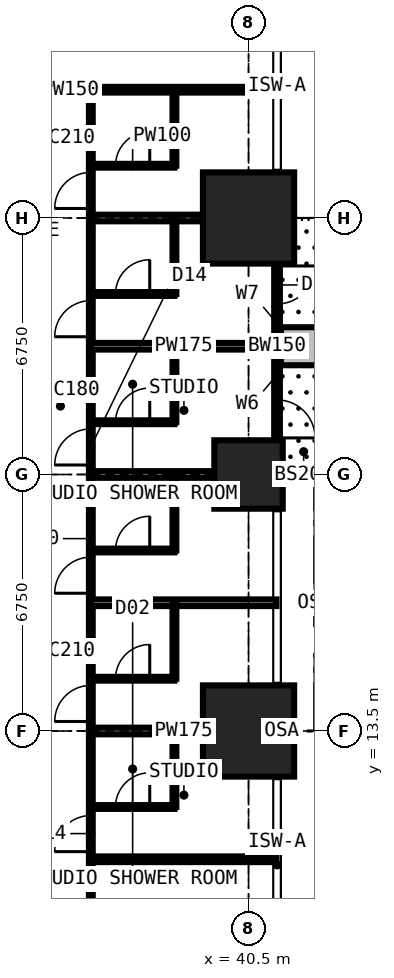
"""IFC4 building model, lengths in metres.
Left out: names, types, materials, properties, quantities, classifications, styles, units other than length and angle.
Written with IfcOpenShell. Run it as: python <this file> out.ifc"""

import sys

from ifc_helpers import new_model, si_unit, direction, frame, frame_2d, origin, origin_2d, place, context, subcontext, project, spatial, rectangle, extrude, element, fill, save


model = new_model("IFC4")
c1 = context("Model", 3, precision=1e-05, world=origin(), true_north=direction((0.0, 1.0)))
c2 = subcontext(c1, "Body", "Model", "MODEL_VIEW")
j1 = project(units=[si_unit("LENGTHUNIT", "METRE"), si_unit("PLANEANGLEUNIT", "RADIAN")], contexts=[c1])
p1 = place(None, origin())
s1 = spatial("IfcSite", under=j1, at=p1, CompositionType="ELEMENT")
p2 = place(p1, origin())
s2 = spatial("IfcBuilding", under=s1, at=p2, CompositionType="ELEMENT")
p3 = place(p2, frame((0.0, 0.0, 72.0)))
s3 = spatial("IfcBuildingStorey", under=s2, at=p3, CompositionType="ELEMENT", Elevation=72.0)
p4 = place(p3, frame((40.5, 13.5, 0.0), z_axis=(0.0, 0.0, 1.0), x_axis=(1.0, 0.0, 0.0)))
e1 = element("IfcColumn", 1, at=p4, inside=s3, PredefinedType="COLUMN", context=c2, shape_type="SweptSolid", body=[
    extrude(rectangle(XDim=2.4, YDim=2.4, at=origin_2d()), origin(), (0.0, 0.0, 1.0), 3.6),
])
p5 = place(p3, frame((40.5, 20.25, 0.0), z_axis=(0.0, 0.0, 1.0), x_axis=(1.0, 0.0, 0.0)))
e2 = element("IfcColumn", 2, at=p5, inside=s3, PredefinedType="COLUMN", context=c2, shape_type="SweptSolid", body=[
    extrude(rectangle(XDim=1.8, YDim=1.8, at=origin_2d()), origin(), (0.0, 0.0, 1.0), 3.6),
])
p6 = place(p3, frame((40.5, 27.0, 0.0), z_axis=(0.0, 0.0, 1.0), x_axis=(1.0, 0.0, 0.0)))
e3 = element("IfcColumn", 3, at=p6, inside=s3, PredefinedType="COLUMN", context=c2, shape_type="SweptSolid", body=[
    extrude(rectangle(XDim=2.4, YDim=2.4, at=origin_2d()), origin(), (0.0, 0.0, 1.0), 3.6),
])
p7 = place(p3, frame((41.25, 27.0, 0.0), z_axis=(0.0, 0.0, 1.0), x_axis=(0.0, -1.0, 0.0)))
e4 = element("IfcWall", 4, at=p7, inside=s3, PredefinedType="SOLIDWALL", context=c2, shape_type="SweptSolid", body=[
    extrude(rectangle(XDim=6.75, YDim=0.15, at=frame_2d((3.375, 0.0))), origin(), (0.0, 0.0, 1.0), 3.3),
])
p8 = place(p7, frame((1.262, 0.0, 0.0)))
e5 = element("IfcOpeningElement", 5, at=p8, cuts=e4, PredefinedType="OPENING", context=c2, shape_type="SweptSolid", body=[
    extrude(rectangle(XDim=1.0, YDim=2.2, at=frame_2d((0.5, 1.1))), frame((0.0, 0.085, 0.0), z_axis=(0.0, -1.0, 0.0), x_axis=(1.0, 0.0, 0.0)), (0.0, 0.0, 1.0), 0.17),
])
p9 = place(p7, frame((2.325, 0.0, 0.9)))
e6 = element("IfcOpeningElement", 6, at=p9, cuts=e4, PredefinedType="OPENING", context=c2, shape_type="SweptSolid", body=[
    extrude(rectangle(XDim=0.9, YDim=1.8, at=frame_2d((0.45, 0.9))), frame((0.0, 0.085, 0.0), z_axis=(0.0, -1.0, 0.0), x_axis=(1.0, 0.0, 0.0)), (0.0, 0.0, 1.0), 0.17),
])
p10 = place(p7, frame((4.788, 0.0, 0.0)))
e7 = element("IfcOpeningElement", 7, at=p10, cuts=e4, PredefinedType="OPENING", context=c2, shape_type="SweptSolid", body=[
    extrude(rectangle(XDim=1.0, YDim=2.2, at=frame_2d((0.5, 1.1))), frame((0.0, 0.085, 0.0), z_axis=(0.0, -1.0, 0.0), x_axis=(1.0, 0.0, 0.0)), (0.0, 0.0, 1.0), 0.17),
])
p11 = place(p7, frame((3.525, 0.0, 0.9)))
e8 = element("IfcOpeningElement", 8, at=p11, cuts=e4, PredefinedType="OPENING", context=c2, shape_type="SweptSolid", body=[
    extrude(rectangle(XDim=1.2, YDim=1.8, at=frame_2d((0.6, 0.9))), frame((0.0, 0.085, 0.0), z_axis=(0.0, -1.0, 0.0), x_axis=(1.0, 0.0, 0.0)), (0.0, 0.0, 1.0), 0.17),
])
p12 = place(p3, frame((41.35, 23.625, 0.0), z_axis=(0.0, 0.0, 1.0), x_axis=(1.0, 0.0, 0.0)))
e9 = element("IfcWall", 9, at=p12, inside=s3, PredefinedType="USERDEFINED", context=c2, shape_type="SweptSolid", body=[
    extrude(rectangle(XDim=2.2, YDim=1.0, at=frame_2d((1.1, 0.0))), origin(), (0.0, 0.0, 1.0), 0.9),
])
p13 = place(p3, frame((30.375, 30.375, 0.0), z_axis=(0.0, 0.0, 1.0), x_axis=(1.0, 0.0, 0.0)))
e10 = element("IfcWall", 10, at=p13, inside=s3, PredefinedType="PARTITIONING", context=c2, shape_type="SweptSolid", body=[
    extrude(rectangle(XDim=10.859, YDim=0.15, at=frame_2d((5.429, 0.0))), origin(), (0.0, 0.0, 1.0), 3.3),
])
p14 = place(p3, frame((36.35, 6.75, 0.0), z_axis=(0.0, 0.0, 1.0), x_axis=(0.0, 1.0, 0.0)))
e11 = element("IfcWall", 11, at=p14, inside=s3, PredefinedType="PARTITIONING", context=c2, shape_type="SweptSolid", body=[
    extrude(rectangle(XDim=23.625, YDim=0.1, at=frame_2d((11.812, 0.0))), origin(), (0.0, 0.0, 1.0), 3.3),
])
p15 = place(p14, frame((3.575, 0.0, 0.0)))
e12 = element("IfcOpeningElement", 12, at=p15, cuts=e11, PredefinedType="OPENING", context=c2, shape_type="SweptSolid", body=[
    extrude(rectangle(XDim=0.95, YDim=2.2, at=frame_2d((0.475, 1.1))), frame((0.0, 0.06, 0.0), z_axis=(0.0, -1.0, 0.0), x_axis=(1.0, 0.0, 0.0)), (0.0, 0.0, 1.0), 0.12),
])
p16 = place(p14, frame((7.0, 0.0, 0.0)))
e13 = element("IfcOpeningElement", 13, at=p16, cuts=e11, PredefinedType="OPENING", context=c2, shape_type="SweptSolid", body=[
    extrude(rectangle(XDim=0.95, YDim=2.2, at=frame_2d((0.475, 1.1))), frame((0.0, 0.06, 0.0), z_axis=(0.0, -1.0, 0.0), x_axis=(1.0, 0.0, 0.0)), (0.0, 0.0, 1.0), 0.12),
])
p17 = place(p14, frame((10.375, 0.0, 0.0)))
e14 = element("IfcOpeningElement", 14, at=p17, cuts=e11, PredefinedType="OPENING", context=c2, shape_type="SweptSolid", body=[
    extrude(rectangle(XDim=0.95, YDim=2.2, at=frame_2d((0.475, 1.1))), frame((0.0, 0.06, 0.0), z_axis=(0.0, -1.0, 0.0), x_axis=(1.0, 0.0, 0.0)), (0.0, 0.0, 1.0), 0.12),
])
p18 = place(p14, frame((13.75, 0.0, 0.0)))
e15 = element("IfcOpeningElement", 15, at=p18, cuts=e11, PredefinedType="OPENING", context=c2, shape_type="SweptSolid", body=[
    extrude(rectangle(XDim=0.95, YDim=2.2, at=frame_2d((0.475, 1.1))), frame((0.0, 0.06, 0.0), z_axis=(0.0, -1.0, 0.0), x_axis=(1.0, 0.0, 0.0)), (0.0, 0.0, 1.0), 0.12),
])
p19 = place(p14, frame((17.125, 0.0, 0.0)))
e16 = element("IfcOpeningElement", 16, at=p19, cuts=e11, PredefinedType="OPENING", context=c2, shape_type="SweptSolid", body=[
    extrude(rectangle(XDim=0.95, YDim=2.2, at=frame_2d((0.475, 1.1))), frame((0.0, 0.06, 0.0), z_axis=(0.0, -1.0, 0.0), x_axis=(1.0, 0.0, 0.0)), (0.0, 0.0, 1.0), 0.12),
])
p20 = place(p14, frame((20.5, 0.0, 0.0)))
e17 = element("IfcOpeningElement", 17, at=p20, cuts=e11, PredefinedType="OPENING", context=c2, shape_type="SweptSolid", body=[
    extrude(rectangle(XDim=0.95, YDim=2.2, at=frame_2d((0.475, 1.1))), frame((0.0, 0.06, 0.0), z_axis=(0.0, -1.0, 0.0), x_axis=(1.0, 0.0, 0.0)), (0.0, 0.0, 1.0), 0.12),
])
p21 = place(p3, frame((36.35, 10.125, 0.0), z_axis=(0.0, 0.0, 1.0), x_axis=(1.0, 0.0, 0.0)))
e18 = element("IfcWall", 18, at=p21, inside=s3, PredefinedType="PARTITIONING", context=c2, shape_type="SweptSolid", body=[
    extrude(rectangle(XDim=4.884, YDim=0.15, at=frame_2d((2.442, 0.0))), origin(), (0.0, 0.0, 1.0), 3.3),
])
p22 = place(p3, frame((36.35, 11.5, 0.0), z_axis=(0.0, 0.0, 1.0), x_axis=(1.0, 0.0, 0.0)))
e19 = element("IfcWall", 19, at=p22, inside=s3, PredefinedType="PARTITIONING", context=c2, shape_type="SweptSolid", body=[
    extrude(rectangle(XDim=2.2, YDim=0.1, at=frame_2d((1.1, 0.0))), origin(), (0.0, 0.0, 1.0), 3.3),
])
p23 = place(p22, frame((0.65, 0.0, 0.0)))
e20 = element("IfcOpeningElement", 20, at=p23, cuts=e19, PredefinedType="OPENING", context=c2, shape_type="SweptSolid", body=[
    extrude(rectangle(XDim=0.9, YDim=2.2, at=frame_2d((0.45, 1.1))), frame((0.0, 0.06, 0.0), z_axis=(0.0, -1.0, 0.0), x_axis=(1.0, 0.0, 0.0)), (0.0, 0.0, 1.0), 0.12),
])
p24 = place(p3, frame((36.35, 13.5, 0.0), z_axis=(0.0, 0.0, 1.0), x_axis=(1.0, 0.0, 0.0)))
e21 = element("IfcWall", 21, at=p24, inside=s3, PredefinedType="PARTITIONING", context=c2, shape_type="SweptSolid", body=[
    extrude(rectangle(XDim=4.884, YDim=0.175, at=frame_2d((2.442, 0.0))), origin(), (0.0, 0.0, 1.0), 2.731),
])
p25 = place(p3, frame((36.35, 14.875, 0.0), z_axis=(0.0, 0.0, 1.0), x_axis=(1.0, 0.0, 0.0)))
e22 = element("IfcWall", 22, at=p25, inside=s3, PredefinedType="PARTITIONING", context=c2, shape_type="SweptSolid", body=[
    extrude(rectangle(XDim=2.2, YDim=0.1, at=frame_2d((1.1, 0.0))), origin(), (0.0, 0.0, 1.0), 3.3),
])
p26 = place(p25, frame((0.65, 0.0, 0.0)))
e23 = element("IfcOpeningElement", 23, at=p26, cuts=e22, PredefinedType="OPENING", context=c2, shape_type="SweptSolid", body=[
    extrude(rectangle(XDim=0.9, YDim=2.2, at=frame_2d((0.45, 1.1))), frame((0.0, 0.06, 0.0), z_axis=(0.0, -1.0, 0.0), x_axis=(1.0, 0.0, 0.0)), (0.0, 0.0, 1.0), 0.12),
])
p27 = place(p3, frame((36.35, 16.875, 0.0), z_axis=(0.0, 0.0, 1.0), x_axis=(1.0, 0.0, 0.0)))
e24 = element("IfcWall", 24, at=p27, inside=s3, PredefinedType="PARTITIONING", context=c2, shape_type="SweptSolid", body=[
    extrude(rectangle(XDim=4.884, YDim=0.175, at=frame_2d((2.442, 0.0))), origin(), (0.0, 0.0, 1.0), 3.3),
])
p28 = place(p3, frame((36.35, 18.25, 0.0), z_axis=(0.0, 0.0, 1.0), x_axis=(1.0, 0.0, 0.0)))
e25 = element("IfcWall", 25, at=p28, inside=s3, PredefinedType="PARTITIONING", context=c2, shape_type="SweptSolid", body=[
    extrude(rectangle(XDim=2.2, YDim=0.1, at=frame_2d((1.1, 0.0))), origin(), (0.0, 0.0, 1.0), 3.3),
])
p29 = place(p28, frame((0.65, 0.0, 0.0)))
e26 = element("IfcOpeningElement", 26, at=p29, cuts=e25, PredefinedType="OPENING", context=c2, shape_type="SweptSolid", body=[
    extrude(rectangle(XDim=0.9, YDim=2.2, at=frame_2d((0.45, 1.1))), frame((0.0, 0.06, 0.0), z_axis=(0.0, -1.0, 0.0), x_axis=(1.0, 0.0, 0.0)), (0.0, 0.0, 1.0), 0.12),
])
p30 = place(p3, frame((36.35, 20.25, 0.0), z_axis=(0.0, 0.0, 1.0), x_axis=(1.0, 0.0, 0.0)))
e27 = element("IfcWall", 27, at=p30, inside=s3, PredefinedType="PARTITIONING", context=c2, shape_type="SweptSolid", body=[
    extrude(rectangle(XDim=4.884, YDim=0.175, at=frame_2d((2.442, 0.0))), origin(), (0.0, 0.0, 1.0), 2.802),
])
p31 = place(p3, frame((36.35, 21.625, 0.0), z_axis=(0.0, 0.0, 1.0), x_axis=(1.0, 0.0, 0.0)))
e28 = element("IfcWall", 28, at=p31, inside=s3, PredefinedType="PARTITIONING", context=c2, shape_type="SweptSolid", body=[
    extrude(rectangle(XDim=2.2, YDim=0.1, at=frame_2d((1.1, 0.0))), origin(), (0.0, 0.0, 1.0), 3.3),
])
p32 = place(p31, frame((0.65, 0.0, 0.0)))
e29 = element("IfcOpeningElement", 29, at=p32, cuts=e28, PredefinedType="OPENING", context=c2, shape_type="SweptSolid", body=[
    extrude(rectangle(XDim=0.9, YDim=2.2, at=frame_2d((0.45, 1.1))), frame((0.0, 0.06, 0.0), z_axis=(0.0, -1.0, 0.0), x_axis=(1.0, 0.0, 0.0)), (0.0, 0.0, 1.0), 0.12),
])
p33 = place(p3, frame((36.35, 23.625, 0.0), z_axis=(0.0, 0.0, 1.0), x_axis=(1.0, 0.0, 0.0)))
e30 = element("IfcWall", 30, at=p33, inside=s3, PredefinedType="PARTITIONING", context=c2, shape_type="SweptSolid", body=[
    extrude(rectangle(XDim=4.884, YDim=0.175, at=frame_2d((2.442, 0.0))), origin(), (0.0, 0.0, 1.0), 3.3),
])
p34 = place(p3, frame((36.35, 25.0, 0.0), z_axis=(0.0, 0.0, 1.0), x_axis=(1.0, 0.0, 0.0)))
e31 = element("IfcWall", 31, at=p34, inside=s3, PredefinedType="PARTITIONING", context=c2, shape_type="SweptSolid", body=[
    extrude(rectangle(XDim=2.2, YDim=0.1, at=frame_2d((1.1, 0.0))), origin(), (0.0, 0.0, 1.0), 3.3),
])
p35 = place(p34, frame((0.65, 0.0, 0.0)))
e32 = element("IfcOpeningElement", 32, at=p35, cuts=e31, PredefinedType="OPENING", context=c2, shape_type="SweptSolid", body=[
    extrude(rectangle(XDim=0.9, YDim=2.2, at=frame_2d((0.45, 1.1))), frame((0.0, 0.06, 0.0), z_axis=(0.0, -1.0, 0.0), x_axis=(1.0, 0.0, 0.0)), (0.0, 0.0, 1.0), 0.12),
])
p36 = place(p3, frame((36.35, 27.0, 0.0), z_axis=(0.0, 0.0, 1.0), x_axis=(1.0, 0.0, 0.0)))
e33 = element("IfcWall", 33, at=p36, inside=s3, PredefinedType="PARTITIONING", context=c2, shape_type="SweptSolid", body=[
    extrude(rectangle(XDim=4.884, YDim=0.175, at=frame_2d((2.442, 0.0))), origin(), (0.0, 0.0, 1.0), 2.731),
])
p37 = place(p3, frame((36.35, 28.375, 0.0), z_axis=(0.0, 0.0, 1.0), x_axis=(1.0, 0.0, 0.0)))
e34 = element("IfcWall", 34, at=p37, inside=s3, PredefinedType="PARTITIONING", context=c2, shape_type="SweptSolid", body=[
    extrude(rectangle(XDim=2.2, YDim=0.1, at=frame_2d((1.1, 0.0))), origin(), (0.0, 0.0, 1.0), 3.3),
])
p38 = place(p37, frame((0.65, 0.0, 0.0)))
e35 = element("IfcOpeningElement", 35, at=p38, cuts=e34, PredefinedType="OPENING", context=c2, shape_type="SweptSolid", body=[
    extrude(rectangle(XDim=0.9, YDim=2.2, at=frame_2d((0.45, 1.1))), frame((0.0, 0.06, 0.0), z_axis=(0.0, -1.0, 0.0), x_axis=(1.0, 0.0, 0.0)), (0.0, 0.0, 1.0), 0.12),
])
for number, where, z_axis, x_axis in (
    (36, (38.55, 11.5, 0.0), (0.0, 0.0, 1.0), (0.0, 1.0, 0.0)),
    (37, (38.55, 14.875, 0.0), (0.0, 0.0, 1.0), (0.0, 1.0, 0.0)),
    (38, (38.55, 18.25, 0.0), (0.0, 0.0, 1.0), (0.0, 1.0, 0.0)),
    (39, (38.55, 21.625, 0.0), (0.0, 0.0, 1.0), (0.0, 1.0, 0.0)),
    (40, (38.55, 25.0, 0.0), (0.0, 0.0, 1.0), (0.0, 1.0, 0.0)),
    (41, (38.55, 28.375, 0.0), (0.0, 0.0, 1.0), (0.0, 1.0, 0.0)),
):
    element("IfcWall", number, at=place(p3, frame(where, z_axis=z_axis, x_axis=x_axis)), inside=s3, PredefinedType="PARTITIONING", context=c2, shape_type="SweptSolid", body=[
        extrude(rectangle(XDim=2.0, YDim=0.1, at=frame_2d((1.0, 0.0))), origin(), (0.0, 0.0, 1.0), 3.3),
    ])
p39 = place(p8, origin())
e42 = element("IfcDoor", 42, at=p39, inside=s3, OperationType="SINGLE_SWING_LEFT", PredefinedType="DOOR", context=c2, shape_type="SweptSolid", body=[
    extrude(rectangle(XDim=1.0, YDim=2.2, at=frame_2d((0.5, 1.1))), frame((0.0, 0.025, 0.0), z_axis=(0.0, -1.0, 0.0), x_axis=(1.0, 0.0, 0.0)), (0.0, 0.0, 1.0), 0.05),
])
fill(e5, e42)
p40 = place(p9, origin())
e43 = element("IfcWindow", 43, at=p40, inside=s3, PartitioningType="SINGLE_PANEL", PredefinedType="WINDOW", context=c2, shape_type="SweptSolid", body=[
    extrude(rectangle(XDim=0.9, YDim=1.8, at=frame_2d((0.45, 0.9))), frame((0.0, 0.03, 0.0), z_axis=(0.0, -1.0, 0.0), x_axis=(1.0, 0.0, 0.0)), (0.0, 0.0, 1.0), 0.06),
])
fill(e6, e43)
p41 = place(p10, origin())
e44 = element("IfcDoor", 44, at=p41, inside=s3, OperationType="SINGLE_SWING_RIGHT", PredefinedType="DOOR", context=c2, shape_type="SweptSolid", body=[
    extrude(rectangle(XDim=1.0, YDim=2.2, at=frame_2d((0.5, 1.1))), frame((0.0, 0.025, 0.0), z_axis=(0.0, -1.0, 0.0), x_axis=(1.0, 0.0, 0.0)), (0.0, 0.0, 1.0), 0.05),
])
fill(e7, e44)
p42 = place(p11, origin())
e45 = element("IfcWindow", 45, at=p42, inside=s3, PartitioningType="SINGLE_PANEL", PredefinedType="WINDOW", context=c2, shape_type="SweptSolid", body=[
    extrude(rectangle(XDim=1.2, YDim=1.8, at=frame_2d((0.6, 0.9))), frame((0.0, 0.03, 0.0), z_axis=(0.0, -1.0, 0.0), x_axis=(1.0, 0.0, 0.0)), (0.0, 0.0, 1.0), 0.06),
])
fill(e8, e45)
p43 = place(p15, origin())
e46 = element("IfcDoor", 46, at=p43, inside=s3, OperationType="SINGLE_SWING_LEFT", PredefinedType="DOOR", context=c2, shape_type="SweptSolid", body=[
    extrude(rectangle(XDim=0.95, YDim=2.2, at=frame_2d((0.475, 1.1))), frame((0.0, 0.025, 0.0), z_axis=(0.0, -1.0, 0.0), x_axis=(1.0, 0.0, 0.0)), (0.0, 0.0, 1.0), 0.05),
])
fill(e12, e46)
p44 = place(p23, origin())
e47 = element("IfcDoor", 47, at=p44, inside=s3, OperationType="SINGLE_SWING_RIGHT", PredefinedType="DOOR", context=c2, shape_type="SweptSolid", body=[
    extrude(rectangle(XDim=0.9, YDim=2.2, at=frame_2d((0.45, 1.1))), frame((0.0, 0.025, 0.0), z_axis=(0.0, -1.0, 0.0), x_axis=(1.0, 0.0, 0.0)), (0.0, 0.0, 1.0), 0.05),
])
fill(e20, e47)
p45 = place(p16, origin())
e48 = element("IfcDoor", 48, at=p45, inside=s3, OperationType="SINGLE_SWING_LEFT", PredefinedType="DOOR", context=c2, shape_type="SweptSolid", body=[
    extrude(rectangle(XDim=0.95, YDim=2.2, at=frame_2d((0.475, 1.1))), frame((0.0, 0.025, 0.0), z_axis=(0.0, -1.0, 0.0), x_axis=(1.0, 0.0, 0.0)), (0.0, 0.0, 1.0), 0.05),
])
fill(e13, e48)
p46 = place(p26, origin())
e49 = element("IfcDoor", 49, at=p46, inside=s3, OperationType="SINGLE_SWING_RIGHT", PredefinedType="DOOR", context=c2, shape_type="SweptSolid", body=[
    extrude(rectangle(XDim=0.9, YDim=2.2, at=frame_2d((0.45, 1.1))), frame((0.0, 0.025, 0.0), z_axis=(0.0, -1.0, 0.0), x_axis=(1.0, 0.0, 0.0)), (0.0, 0.0, 1.0), 0.05),
])
fill(e23, e49)
p47 = place(p17, origin())
e50 = element("IfcDoor", 50, at=p47, inside=s3, OperationType="SINGLE_SWING_LEFT", PredefinedType="DOOR", context=c2, shape_type="SweptSolid", body=[
    extrude(rectangle(XDim=0.95, YDim=2.2, at=frame_2d((0.475, 1.1))), frame((0.0, 0.025, 0.0), z_axis=(0.0, -1.0, 0.0), x_axis=(1.0, 0.0, 0.0)), (0.0, 0.0, 1.0), 0.05),
])
fill(e14, e50)
p48 = place(p29, origin())
e51 = element("IfcDoor", 51, at=p48, inside=s3, OperationType="SINGLE_SWING_RIGHT", PredefinedType="DOOR", context=c2, shape_type="SweptSolid", body=[
    extrude(rectangle(XDim=0.9, YDim=2.2, at=frame_2d((0.45, 1.1))), frame((0.0, 0.025, 0.0), z_axis=(0.0, -1.0, 0.0), x_axis=(1.0, 0.0, 0.0)), (0.0, 0.0, 1.0), 0.05),
])
fill(e26, e51)
p49 = place(p18, origin())
e52 = element("IfcDoor", 52, at=p49, inside=s3, OperationType="SINGLE_SWING_LEFT", PredefinedType="DOOR", context=c2, shape_type="SweptSolid", body=[
    extrude(rectangle(XDim=0.95, YDim=2.2, at=frame_2d((0.475, 1.1))), frame((0.0, 0.025, 0.0), z_axis=(0.0, -1.0, 0.0), x_axis=(1.0, 0.0, 0.0)), (0.0, 0.0, 1.0), 0.05),
])
fill(e15, e52)
p50 = place(p32, origin())
e53 = element("IfcDoor", 53, at=p50, inside=s3, OperationType="SINGLE_SWING_RIGHT", PredefinedType="DOOR", context=c2, shape_type="SweptSolid", body=[
    extrude(rectangle(XDim=0.9, YDim=2.2, at=frame_2d((0.45, 1.1))), frame((0.0, 0.025, 0.0), z_axis=(0.0, -1.0, 0.0), x_axis=(1.0, 0.0, 0.0)), (0.0, 0.0, 1.0), 0.05),
])
fill(e29, e53)
p51 = place(p19, origin())
e54 = element("IfcDoor", 54, at=p51, inside=s3, OperationType="SINGLE_SWING_LEFT", PredefinedType="DOOR", context=c2, shape_type="SweptSolid", body=[
    extrude(rectangle(XDim=0.95, YDim=2.2, at=frame_2d((0.475, 1.1))), frame((0.0, 0.025, 0.0), z_axis=(0.0, -1.0, 0.0), x_axis=(1.0, 0.0, 0.0)), (0.0, 0.0, 1.0), 0.05),
])
fill(e16, e54)
p52 = place(p35, origin())
e55 = element("IfcDoor", 55, at=p52, inside=s3, OperationType="SINGLE_SWING_RIGHT", PredefinedType="DOOR", context=c2, shape_type="SweptSolid", body=[
    extrude(rectangle(XDim=0.9, YDim=2.2, at=frame_2d((0.45, 1.1))), frame((0.0, 0.025, 0.0), z_axis=(0.0, -1.0, 0.0), x_axis=(1.0, 0.0, 0.0)), (0.0, 0.0, 1.0), 0.05),
])
fill(e32, e55)
p53 = place(p20, origin())
e56 = element("IfcDoor", 56, at=p53, inside=s3, OperationType="SINGLE_SWING_LEFT", PredefinedType="DOOR", context=c2, shape_type="SweptSolid", body=[
    extrude(rectangle(XDim=0.95, YDim=2.2, at=frame_2d((0.475, 1.1))), frame((0.0, 0.025, 0.0), z_axis=(0.0, -1.0, 0.0), x_axis=(1.0, 0.0, 0.0)), (0.0, 0.0, 1.0), 0.05),
])
fill(e17, e56)
p54 = place(p38, origin())
e57 = element("IfcDoor", 57, at=p54, inside=s3, OperationType="SINGLE_SWING_RIGHT", PredefinedType="DOOR", context=c2, shape_type="SweptSolid", body=[
    extrude(rectangle(XDim=0.9, YDim=2.2, at=frame_2d((0.45, 1.1))), frame((0.0, 0.025, 0.0), z_axis=(0.0, -1.0, 0.0), x_axis=(1.0, 0.0, 0.0)), (0.0, 0.0, 1.0), 0.05),
])
fill(e35, e57)
save(model, sys.argv[1])
